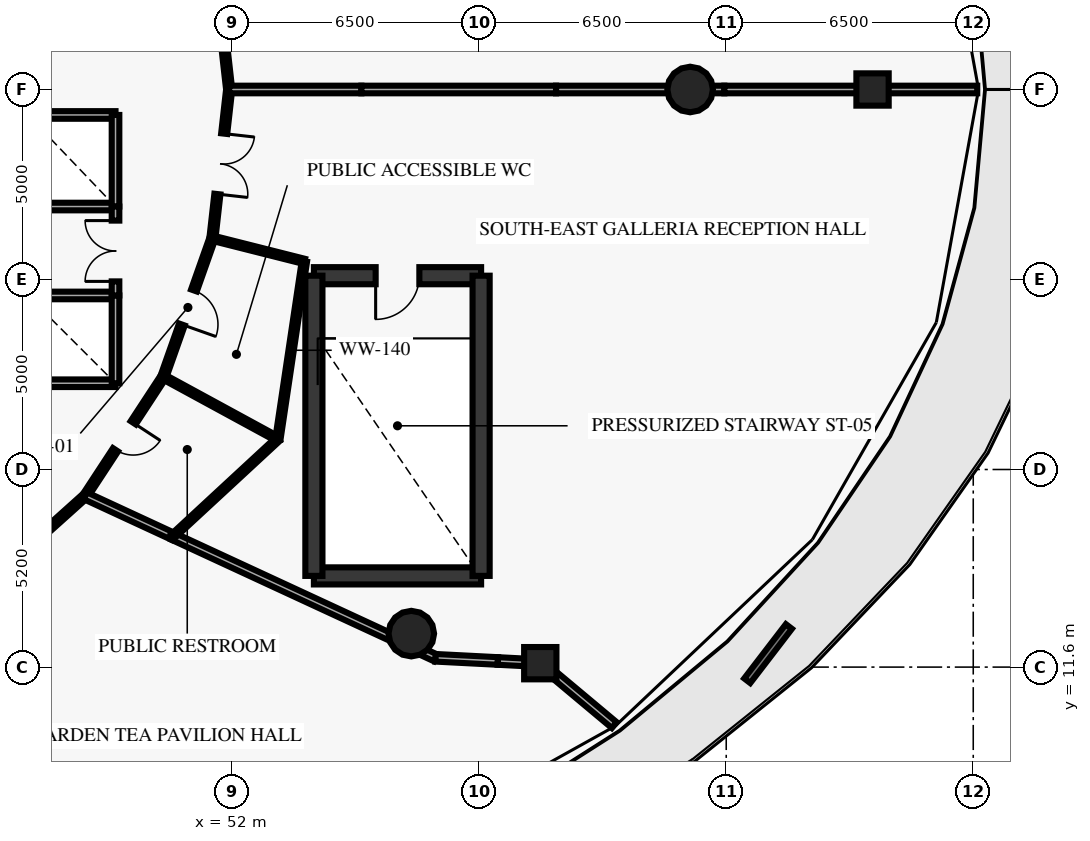
"""IFC4 building model, lengths in metres.
Left out: names, types, materials, properties, quantities, classifications, styles, units other than length and angle.
Written with IfcOpenShell. Run it as: python <this file> out.ifc"""

import sys

from ifc_helpers import new_model, si_unit, direction, frame, frame_2d, origin, origin_2d, place, context, subcontext, project, spatial, rectangle, circle, extrude, element, fill, save


model = new_model("IFC4")
c1 = context("Model", 3, precision=1e-05, world=origin(), true_north=direction((0.0, 1.0)))
c2 = subcontext(c1, "Body", "Model", "MODEL_VIEW")
j1 = project(units=[si_unit("LENGTHUNIT", "METRE"), si_unit("PLANEANGLEUNIT", "RADIAN")], contexts=[c1])
p1 = place(None, origin())
s1 = spatial("IfcSite", under=j1, at=p1, CompositionType="ELEMENT")
p2 = place(p1, origin())
s2 = spatial("IfcBuilding", under=s1, at=p2, CompositionType="ELEMENT")
p3 = place(p2, frame((0.0, 0.0, 16.0)))
s3 = spatial("IfcBuildingStorey", under=s2, at=p3, CompositionType="ELEMENT", Elevation=16.0)
for number, where, z_axis, x_axis in (
    (1, (64.05, 26.8, 0.0), (0.0, 0.0, 1.0), (1.0, 0.0, 0.0)),
    (2, (56.713, 12.481, 0.0), (0.0, 0.0, 1.0), (1.0, 0.0, 0.0)),
):
    element("IfcColumn", number, at=place(p3, frame(where, z_axis=z_axis, x_axis=x_axis)), inside=s3, PredefinedType="COLUMN", context=c2, shape_type="SweptSolid", body=[
        extrude(circle(Radius=0.6, at=origin_2d()), origin(), (0.0, 0.0, 1.0), 4.74),
    ])
for number, where, z_axis, x_axis in (
    (3, (68.85, 26.8, 0.0), (0.0, 0.0, 1.0), (1.0, 0.0, 0.0)),
    (4, (60.107, 11.703, 0.0), (0.0, 0.0, 1.0), (1.0, 0.0, 0.0)),
):
    element("IfcColumn", number, at=place(p3, frame(where, z_axis=z_axis, x_axis=x_axis)), inside=s3, PredefinedType="COLUMN", context=c2, shape_type="SweptSolid", body=[
        extrude(rectangle(XDim=0.85, YDim=0.85, at=origin_2d()), origin(), (0.0, 0.0, 1.0), 4.74),
    ])
p4 = place(p3, frame((66.649, 12.669, 0.0), z_axis=(0.0, 0.0, 1.0), x_axis=(-0.608838635348, -0.793294091814, 0.0)))
e5 = element("IfcWall", 5, at=p4, inside=s3, PredefinedType="ELEMENTEDWALL", context=c2, shape_type="SweptSolid", body=[
    extrude(rectangle(XDim=1.8, YDim=0.2, at=frame_2d((0.9, 0.0))), origin(), (0.0, 0.0, 1.0), 0.65),
])
p5 = place(p3, frame((54.15, 14.0, 0.0), z_axis=(0.0, 0.0, 1.0), x_axis=(1.0, 0.0, 0.0)))
e6 = element("IfcWall", 6, at=p5, inside=s3, PredefinedType="SHEAR", context=c2, shape_type="SweptSolid", body=[
    extrude(rectangle(XDim=4.4, YDim=0.45, at=frame_2d((2.2, 0.0))), origin(), (0.0, 0.0, 1.0), 4.74),
])
p6 = place(p3, frame((58.55, 21.9, 0.0), z_axis=(0.0, 0.0, 1.0), x_axis=(-1.0, 0.0, 0.0)))
e7 = element("IfcWall", 7, at=p6, inside=s3, PredefinedType="SHEAR", context=c2, shape_type="SweptSolid", body=[
    extrude(rectangle(XDim=4.4, YDim=0.45, at=frame_2d((2.2, 0.0))), origin(), (0.0, 0.0, 1.0), 4.74),
])
p7 = place(p6, frame((1.625, 0.0, 0.0)))
e8 = element("IfcOpeningElement", 8, at=p7, cuts=e7, PredefinedType="OPENING", context=c2, shape_type="SweptSolid", body=[
    extrude(rectangle(XDim=1.15, YDim=2.15, at=frame_2d((0.575, 1.075))), frame((0.0, 0.235, 0.0), z_axis=(0.0, -1.0, 0.0), x_axis=(1.0, 0.0, 0.0)), (0.0, 0.0, 1.0), 0.47),
])
for number, where, z_axis, x_axis in (
    (9, (54.15, 14.0, 0.0), (0.0, 0.0, 1.0), (0.0, 1.0, 0.0)),
    (10, (58.55, 14.0, 0.0), (0.0, 0.0, 1.0), (0.0, 1.0, 0.0)),
):
    element("IfcWall", number, at=place(p3, frame(where, z_axis=z_axis, x_axis=x_axis)), inside=s3, PredefinedType="SHEAR", context=c2, shape_type="SweptSolid", body=[
        extrude(rectangle(XDim=7.9, YDim=0.45, at=frame_2d((3.95, 0.0))), origin(), (0.0, 0.0, 1.0), 4.74),
    ])
for number, where, z_axis, x_axis in (
    (11, (46.62, 23.72, 0.0), (0.0, 0.0, 1.0), (1.0, 0.0, 0.0)),
    (12, (46.62, 26.13, 0.0), (0.0, 0.0, 1.0), (1.0, 0.0, 0.0)),
):
    element("IfcWall", number, at=place(p3, frame(where, z_axis=z_axis, x_axis=x_axis)), inside=s3, PredefinedType="SOLIDWALL", context=c2, shape_type="SweptSolid", body=[
        extrude(rectangle(XDim=2.31, YDim=0.2, at=frame_2d((1.155, 0.0))), origin(), (0.0, 0.0, 1.0), 4.74),
    ])
p8 = place(p3, frame((48.93, 23.72, 0.0), z_axis=(0.0, 0.0, 1.0), x_axis=(0.0, 1.0, 0.0)))
e13 = element("IfcWall", 13, at=p8, inside=s3, PredefinedType="SOLIDWALL", context=c2, shape_type="SweptSolid", body=[
    extrude(rectangle(XDim=2.41, YDim=0.2, at=frame_2d((1.205, 0.0))), origin(), (0.0, 0.0, 1.0), 4.74),
])
for number, where, z_axis, x_axis in (
    (14, (46.62, 19.07, 0.0), (0.0, 0.0, 1.0), (1.0, 0.0, 0.0)),
    (15, (46.62, 21.38, 0.0), (0.0, 0.0, 1.0), (1.0, 0.0, 0.0)),
    (16, (48.93, 19.07, 0.0), (0.0, 0.0, 1.0), (0.0, 1.0, 0.0)),
):
    element("IfcWall", number, at=place(p3, frame(where, z_axis=z_axis, x_axis=x_axis)), inside=s3, PredefinedType="SOLIDWALL", context=c2, shape_type="SweptSolid", body=[
        extrude(rectangle(XDim=2.31, YDim=0.2, at=frame_2d((1.155, 0.0))), origin(), (0.0, 0.0, 1.0), 4.74),
    ])
p9 = place(p3, frame((48.93, 21.38, 0.0), z_axis=(0.0, 0.0, 1.0), x_axis=(0.0, 1.0, 0.0)))
e17 = element("IfcWall", 17, at=p9, inside=s3, PredefinedType="SOLIDWALL", context=c2, shape_type="SweptSolid", body=[
    extrude(rectangle(XDim=2.34, YDim=0.2, at=frame_2d((1.17, 0.0))), origin(), (0.0, 0.0, 1.0), 4.74),
])
p10 = place(p9, frame((0.37, 0.0, 0.0)))
e18 = element("IfcOpeningElement", 18, at=p10, cuts=e17, PredefinedType="OPENING", context=c2, shape_type="SweptSolid", body=[
    extrude(rectangle(XDim=1.6, YDim=2.2, at=frame_2d((0.8, 1.1))), frame((0.0, 0.11, 0.0), z_axis=(0.0, -1.0, 0.0), x_axis=(1.0, 0.0, 0.0)), (0.0, 0.0, 1.0), 0.22),
])
p11 = place(p3, frame((51.92, 26.8, 0.0), z_axis=(0.0, 0.0, 1.0), x_axis=(-0.111731247657, 0.993738460711, 0.0)))
e19 = element("IfcWall", 19, at=p11, inside=s3, PredefinedType="PARTITIONING", context=c2, shape_type="SweptSolid", body=[
    extrude(rectangle(XDim=3.938, YDim=0.16, at=frame_2d((1.969, 0.0))), origin(), (0.0, 0.0, 1.0), 4.74),
])
p12 = place(p3, frame((45.46, 13.706, 0.0), z_axis=(0.0, 0.0, 1.0), x_axis=(0.744066617248, 0.668105432621, 0.0)))
e20 = element("IfcWall", 20, at=p12, inside=s3, PredefinedType="PARTITIONING", context=c2, shape_type="SweptSolid", body=[
    extrude(rectangle(XDim=3.596, YDim=0.16, at=frame_2d((1.798, 0.0))), origin(), (0.0, 0.0, 1.0), 4.74),
])
p13 = place(p3, frame((50.189, 19.24, 0.0), z_axis=(0.0, 0.0, 1.0), x_axis=(-0.548318837904, -0.836269365694, 0.0)))
e21 = element("IfcWall", 21, at=p13, inside=s3, PredefinedType="PARTITIONING", context=c2, shape_type="SweptSolid", body=[
    extrude(rectangle(XDim=3.744, YDim=0.16, at=frame_2d((1.872, 0.0))), origin(), (0.0, 0.0, 1.0), 4.74),
])
p14 = place(p13, frame((1.447, 0.0, 0.0)))
e22 = element("IfcOpeningElement", 22, at=p14, cuts=e21, PredefinedType="OPENING", context=c2, shape_type="SweptSolid", body=[
    extrude(rectangle(XDim=0.85, YDim=2.1, at=frame_2d((0.425, 1.05))), frame((0.0, 0.09, 0.0), z_axis=(0.0, -1.0, 0.0), x_axis=(1.0, 0.0, 0.0)), (0.0, 0.0, 1.0), 0.18),
])
p15 = place(p3, frame((51.48, 22.887, 0.0), z_axis=(0.0, 0.0, 1.0), x_axis=(-0.333704620558, -0.942677689467, 0.0)))
e23 = element("IfcWall", 23, at=p15, inside=s3, PredefinedType="PARTITIONING", context=c2, shape_type="SweptSolid", body=[
    extrude(rectangle(XDim=3.869, YDim=0.16, at=frame_2d((1.934, 0.0))), origin(), (0.0, 0.0, 1.0), 4.74),
])
p16 = place(p15, frame((1.459, 0.0, 0.0)))
e24 = element("IfcOpeningElement", 24, at=p16, cuts=e23, PredefinedType="OPENING", context=c2, shape_type="SweptSolid", body=[
    extrude(rectangle(XDim=0.95, YDim=2.1, at=frame_2d((0.475, 1.05))), frame((0.0, 0.09, 0.0), z_axis=(0.0, -1.0, 0.0), x_axis=(1.0, 0.0, 0.0)), (0.0, 0.0, 1.0), 0.18),
])
p17 = place(p3, frame((51.92, 26.8, 0.0), z_axis=(0.0, 0.0, 1.0), x_axis=(-0.111724363671, -0.99373923469, 0.0)))
e25 = element("IfcWall", 25, at=p17, inside=s3, PredefinedType="PARTITIONING", context=c2, shape_type="SweptSolid", body=[
    extrude(rectangle(XDim=3.938, YDim=0.16, at=frame_2d((1.969, 0.0))), origin(), (0.0, 0.0, 1.0), 4.74),
])
p18 = place(p17, frame((1.169, 0.0, 0.0)))
e26 = element("IfcOpeningElement", 26, at=p18, cuts=e25, PredefinedType="OPENING", context=c2, shape_type="SweptSolid", body=[
    extrude(rectangle(XDim=1.6, YDim=2.2, at=frame_2d((0.8, 1.1))), frame((0.0, 0.09, 0.0), z_axis=(0.0, -1.0, 0.0), x_axis=(1.0, 0.0, 0.0)), (0.0, 0.0, 1.0), 0.18),
])
p19 = place(p3, frame((51.92, 26.8, 0.0), z_axis=(0.0, 0.0, 1.0), x_axis=(1.0, 0.0, 0.0)))
e27 = element("IfcWall", 27, at=p19, inside=s3, PredefinedType="PARTITIONING", context=c2, shape_type="SweptSolid", body=[
    extrude(rectangle(XDim=3.48, YDim=0.2, at=frame_2d((1.74, 0.0))), origin(), (0.0, 0.0, 1.0), 4.74),
])
p20 = place(p3, frame((55.4, 26.8, 0.0), z_axis=(0.0, 0.0, 1.0), x_axis=(1.0, 0.0, 0.0)))
e28 = element("IfcWall", 28, at=p20, inside=s3, PredefinedType="PARTITIONING", context=c2, shape_type="SweptSolid", body=[
    extrude(rectangle(XDim=5.122, YDim=0.2, at=frame_2d((2.561, 0.0))), origin(), (0.0, 0.0, 1.0), 4.74),
])
p21 = place(p3, frame((60.522, 26.8, 0.0), z_axis=(0.0, 0.0, 1.0), x_axis=(1.0, 0.0, 0.0)))
e29 = element("IfcWall", 29, at=p21, inside=s3, PredefinedType="PARTITIONING", context=c2, shape_type="SweptSolid", body=[
    extrude(rectangle(XDim=4.428, YDim=0.2, at=frame_2d((2.214, 0.0))), origin(), (0.0, 0.0, 1.0), 2.74),
])
p22 = place(p3, frame((64.95, 26.8, 0.0), z_axis=(0.0, 0.0, 1.0), x_axis=(1.0, 0.0, 0.0)))
e30 = element("IfcWall", 30, at=p22, inside=s3, PredefinedType="PARTITIONING", context=c2, shape_type="SweptSolid", body=[
    extrude(rectangle(XDim=3.9, YDim=0.2, at=frame_2d((1.95, 0.0))), origin(), (0.0, 0.0, 1.0), 4.28),
])
p23 = place(p3, frame((68.85, 26.8, 0.0), z_axis=(0.0, 0.0, 1.0), x_axis=(1.0, 0.0, 0.0)))
e31 = element("IfcWall", 31, at=p23, inside=s3, PredefinedType="PARTITIONING", context=c2, shape_type="SweptSolid", body=[
    extrude(rectangle(XDim=2.755, YDim=0.2, at=frame_2d((1.377, 0.0))), origin(), (0.0, 0.0, 1.0), 4.74),
])
p24 = place(p3, frame((48.136, 16.109, 0.0), z_axis=(0.0, 0.0, 1.0), x_axis=(0.907508335547, -0.420034071133, 0.0)))
e32 = element("IfcWall", 32, at=p24, inside=s3, PredefinedType="PARTITIONING", context=c2, shape_type="SweptSolid", body=[
    extrude(rectangle(XDim=2.538, YDim=0.2, at=frame_2d((1.269, 0.0))), origin(), (0.0, 0.0, 1.0), 4.74),
])
p25 = place(p3, frame((50.439, 15.043, 0.0), z_axis=(0.0, 0.0, 1.0), x_axis=(0.907524397356, -0.419999366908, 0.0)))
e33 = element("IfcWall", 33, at=p25, inside=s3, PredefinedType="PARTITIONING", context=c2, shape_type="SweptSolid", body=[
    extrude(rectangle(XDim=7.614, YDim=0.2, at=frame_2d((3.807, 0.0))), origin(), (0.0, 0.0, 1.0), 4.74),
])
p26 = place(p3, frame((57.349, 11.845, 0.0), z_axis=(0.0, 0.0, 1.0), x_axis=(0.998692725363, -0.051115949639, 0.0)))
e34 = element("IfcWall", 34, at=p26, inside=s3, PredefinedType="PARTITIONING", context=c2, shape_type="SweptSolid", body=[
    extrude(rectangle(XDim=1.643, YDim=0.2, at=frame_2d((0.822, 0.0))), origin(), (0.0, 0.0, 1.0), 4.74),
])
p27 = place(p3, frame((58.99, 11.761, 0.0), z_axis=(0.0, 0.0, 1.0), x_axis=(0.998649603439, -0.051951607785, 0.0)))
e35 = element("IfcWall", 35, at=p27, inside=s3, PredefinedType="PARTITIONING", context=c2, shape_type="SweptSolid", body=[
    extrude(rectangle(XDim=1.118, YDim=0.2, at=frame_2d((0.559, 0.0))), origin(), (0.0, 0.0, 1.0), 4.28),
])
p28 = place(p3, frame((60.107, 11.703, 0.0), z_axis=(0.0, 0.0, 1.0), x_axis=(0.76695128647, -0.641705325038, 0.0)))
e36 = element("IfcWall", 36, at=p28, inside=s3, PredefinedType="PARTITIONING", context=c2, shape_type="SweptSolid", body=[
    extrude(rectangle(XDim=2.54, YDim=0.2, at=frame_2d((1.27, 0.0))), origin(), (0.0, 0.0, 1.0), 4.74),
])
p29 = place(p3, frame((50.189, 19.24, 0.0), z_axis=(0.0, 0.0, 1.0), x_axis=(0.878392721738, -0.477939563541, 0.0)))
e37 = element("IfcWall", 37, at=p29, inside=s3, PredefinedType="PARTITIONING", context=c2, shape_type="SweptSolid", body=[
    extrude(rectangle(XDim=3.431, YDim=0.14, at=frame_2d((1.716, 0.0))), origin(), (0.0, 0.0, 1.0), 4.74),
])
p30 = place(p3, frame((51.48, 22.887, 0.0), z_axis=(0.0, 0.0, 1.0), x_axis=(0.969564374521, -0.244836524357, 0.0)))
e38 = element("IfcWall", 38, at=p30, inside=s3, PredefinedType="PARTITIONING", context=c2, shape_type="SweptSolid", body=[
    extrude(rectangle(XDim=2.496, YDim=0.14, at=frame_2d((1.248, 0.0))), origin(), (0.0, 0.0, 1.0), 4.74),
])
p31 = place(p3, frame((50.439, 15.043, 0.0), z_axis=(0.0, 0.0, 1.0), x_axis=(0.734032370371, 0.679114481695, 0.0)))
e39 = element("IfcWall", 39, at=p31, inside=s3, PredefinedType="PARTITIONING", context=c2, shape_type="SweptSolid", body=[
    extrude(rectangle(XDim=3.765, YDim=0.14, at=frame_2d((1.883, 0.0))), origin(), (0.0, 0.0, 1.0), 4.74),
])
p32 = place(p3, frame((53.203, 17.6, 0.0), z_axis=(0.0, 0.0, 1.0), x_axis=(0.147441370436, 0.989070797407, 0.0)))
e40 = element("IfcWall", 40, at=p32, inside=s3, PredefinedType="PARTITIONING", context=c2, shape_type="SweptSolid", body=[
    extrude(rectangle(XDim=4.728, YDim=0.14, at=frame_2d((2.364, 0.0))), origin(), (0.0, 0.0, 1.0), 4.74),
])
p33 = place(p7, origin())
e41 = element("IfcDoor", 41, at=p33, inside=s3, OperationType="SINGLE_SWING_RIGHT", PredefinedType="DOOR", context=c2, shape_type="SweptSolid", body=[
    extrude(rectangle(XDim=1.15, YDim=2.15, at=frame_2d((0.575, 1.075))), frame((0.0, 0.025, 0.0), z_axis=(0.0, -1.0, 0.0), x_axis=(1.0, 0.0, 0.0)), (0.0, 0.0, 1.0), 0.05),
])
fill(e8, e41)
p34 = place(p10, origin())
e42 = element("IfcDoor", 42, at=p34, inside=s3, OperationType="DOUBLE_DOOR_SINGLE_SWING", PredefinedType="DOOR", context=c2, shape_type="SweptSolid", body=[
    extrude(rectangle(XDim=1.6, YDim=2.2, at=frame_2d((0.8, 1.1))), frame((0.0, 0.025, 0.0), z_axis=(0.0, -1.0, 0.0), x_axis=(1.0, 0.0, 0.0)), (0.0, 0.0, 1.0), 0.05),
])
fill(e18, e42)
p35 = place(p14, origin())
e43 = element("IfcDoor", 43, at=p35, inside=s3, OperationType="SINGLE_SWING_LEFT", PredefinedType="DOOR", context=c2, shape_type="SweptSolid", body=[
    extrude(rectangle(XDim=0.85, YDim=2.1, at=frame_2d((0.425, 1.05))), frame((0.0, 0.025, 0.0), z_axis=(0.0, -1.0, 0.0), x_axis=(1.0, 0.0, 0.0)), (0.0, 0.0, 1.0), 0.05),
])
fill(e22, e43)
p36 = place(p16, origin())
e44 = element("IfcDoor", 44, at=p36, inside=s3, OperationType="SINGLE_SWING_RIGHT", PredefinedType="DOOR", context=c2, shape_type="SweptSolid", body=[
    extrude(rectangle(XDim=0.95, YDim=2.1, at=frame_2d((0.475, 1.05))), frame((0.0, 0.025, 0.0), z_axis=(0.0, -1.0, 0.0), x_axis=(1.0, 0.0, 0.0)), (0.0, 0.0, 1.0), 0.05),
])
fill(e24, e44)
p37 = place(p18, origin())
e45 = element("IfcDoor", 45, at=p37, inside=s3, OperationType="DOUBLE_DOOR_SINGLE_SWING", PredefinedType="DOOR", context=c2, shape_type="SweptSolid", body=[
    extrude(rectangle(XDim=1.6, YDim=2.2, at=frame_2d((0.8, 1.1))), frame((0.0, 0.025, 0.0), z_axis=(0.0, -1.0, 0.0), x_axis=(1.0, 0.0, 0.0)), (0.0, 0.0, 1.0), 0.05),
])
fill(e26, e45)
save(model, sys.argv[1])
